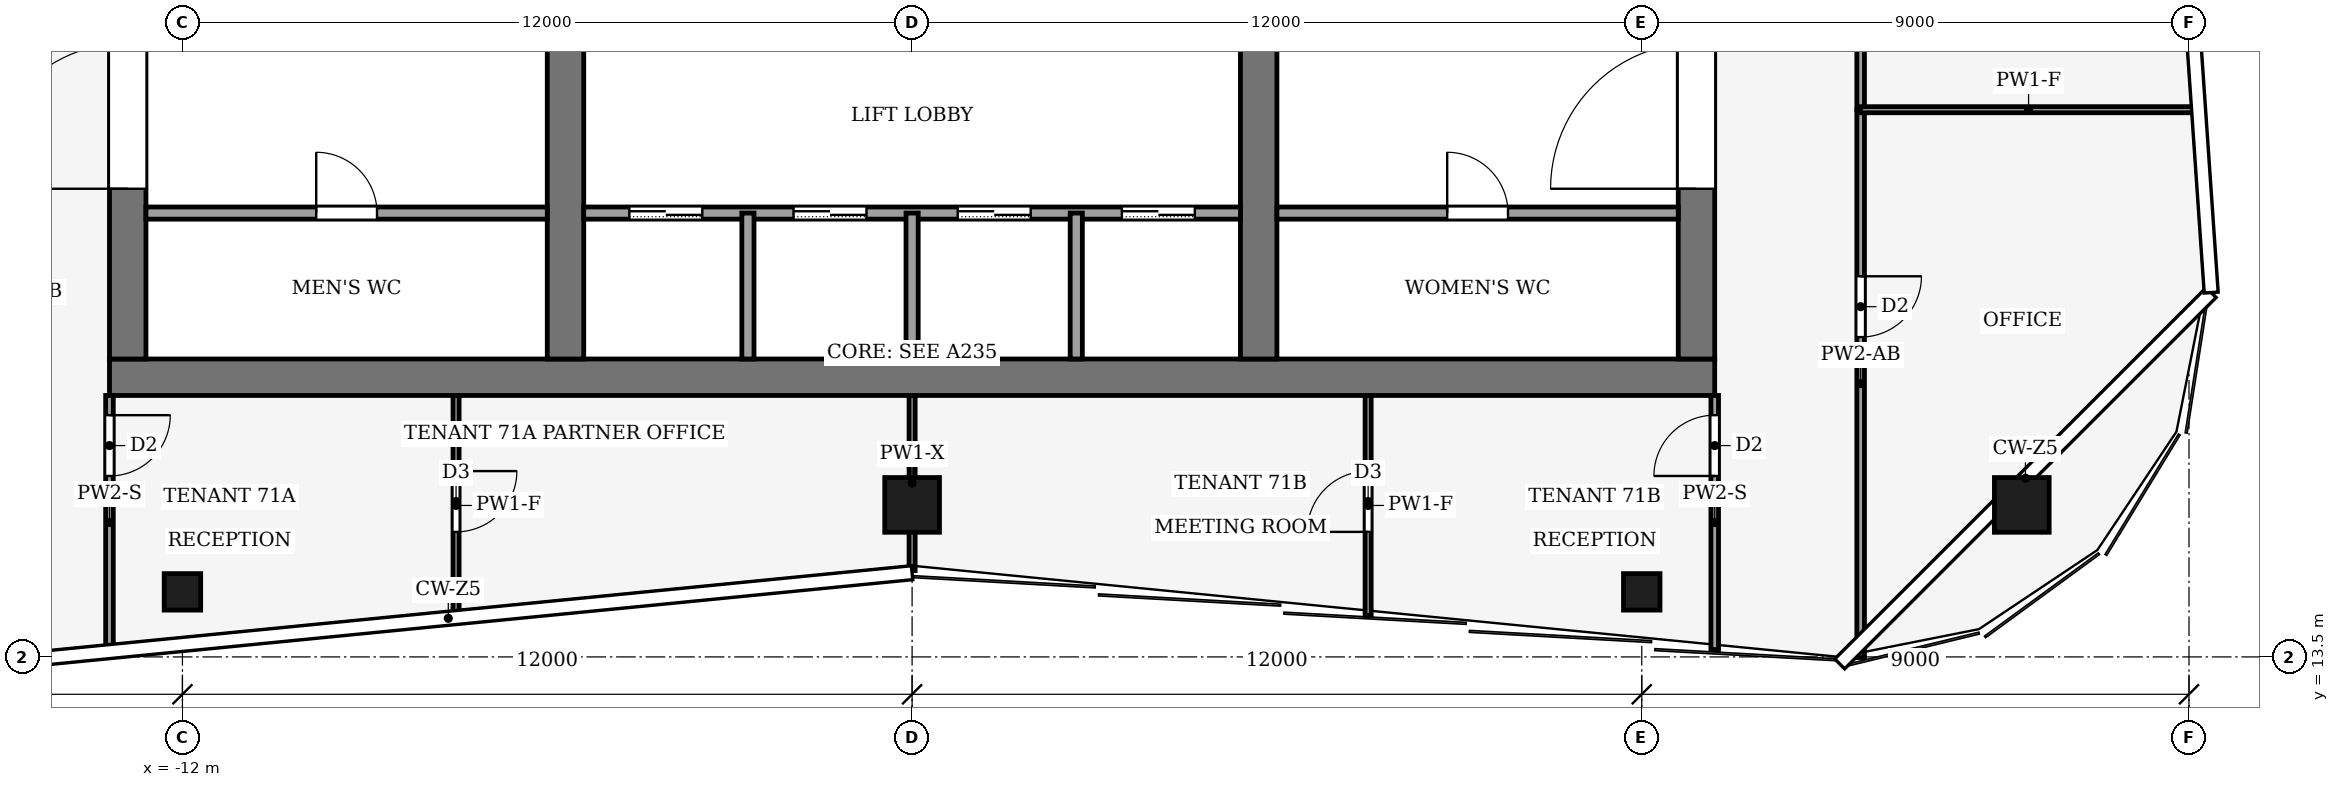
"""IFC4 building model, lengths in metres.
Left out: names, types, materials, properties, quantities, classifications, styles, units other than length and angle.
Written with IfcOpenShell. Run it as: python <this file> out.ifc"""

import sys

from ifc_helpers import new_model, si_unit, direction, frame, frame_2d, origin, origin_2d, place, context, subcontext, project, spatial, rectangle, hollow_rectangle, extrude, element, fill, save


model = new_model("IFC4")
c1 = context("Model", 3, precision=1e-05, world=origin(), true_north=direction((0.0, 1.0)))
c2 = subcontext(c1, "Body", "Model", "MODEL_VIEW")
j1 = project(units=[si_unit("LENGTHUNIT", "METRE"), si_unit("PLANEANGLEUNIT", "RADIAN")], contexts=[c1])
p1 = place(None, origin())
s1 = spatial("IfcSite", under=j1, at=p1, CompositionType="ELEMENT")
p2 = place(p1, origin())
s2 = spatial("IfcBuilding", under=s1, at=p2, CompositionType="ELEMENT")
p3 = place(p2, frame((0.0, 0.0, 310.0)))
s3 = spatial("IfcBuildingStorey", under=s2, at=p3, CompositionType="ELEMENT", Elevation=310.0)
p4 = place(p3, frame((-13.2, 18.1, -0.13), z_axis=(0.0, 0.0, 1.0), x_axis=(1.0, 0.0, 0.0)))
e1 = element("IfcWall", 1, at=p4, inside=s3, PredefinedType="SHEAR", context=c2, shape_type="SweptSolid", body=[
    extrude(rectangle(XDim=26.4, YDim=0.6, at=frame_2d((13.2, 0.0))), origin(), (0.0, 0.0, 1.0), 4.0),
])
p5 = place(p3, frame((-12.9, 18.4, -0.13), z_axis=(0.0, 0.0, 1.0), x_axis=(0.0, 1.0, 0.0)))
e2 = element("IfcWall", 2, at=p5, inside=s3, PredefinedType="SHEAR", context=c2, shape_type="SweptSolid", body=[
    extrude(rectangle(XDim=19.2, YDim=0.6, at=frame_2d((9.6, 0.0))), origin(), (0.0, 0.0, 1.0), 4.0),
])
p6 = place(p5, frame((2.8, 0.0, 0.13)))
e3 = element("IfcOpeningElement", 3, at=p6, cuts=e2, PredefinedType="OPENING", context=c2, shape_type="SweptSolid", body=[
    extrude(rectangle(XDim=2.4, YDim=2.4, at=frame_2d((1.2, 1.2))), frame((0.0, 0.31, 0.0), z_axis=(0.0, -1.0, 0.0), x_axis=(1.0, 0.0, 0.0)), (0.0, 0.0, 1.0), 0.62),
])
p7 = place(p5, frame((13.4, 0.0, 0.13)))
e4 = element("IfcOpeningElement", 4, at=p7, cuts=e2, PredefinedType="OPENING", context=c2, shape_type="SweptSolid", body=[
    extrude(rectangle(XDim=1.4, YDim=2.2, at=frame_2d((0.7, 1.1))), frame((0.0, 0.31, 0.0), z_axis=(0.0, -1.0, 0.0), x_axis=(1.0, 0.0, 0.0)), (0.0, 0.0, 1.0), 0.62),
])
p8 = place(p3, frame((12.9, 18.4, -0.13), z_axis=(0.0, 0.0, 1.0), x_axis=(0.0, 1.0, 0.0)))
e5 = element("IfcWall", 5, at=p8, inside=s3, PredefinedType="SHEAR", context=c2, shape_type="SweptSolid", body=[
    extrude(rectangle(XDim=19.2, YDim=0.6, at=frame_2d((9.6, 0.0))), origin(), (0.0, 0.0, 1.0), 4.0),
])
p9 = place(p8, frame((2.8, 0.0, 0.13)))
e6 = element("IfcOpeningElement", 6, at=p9, cuts=e5, PredefinedType="OPENING", context=c2, shape_type="SweptSolid", body=[
    extrude(rectangle(XDim=2.4, YDim=2.4, at=frame_2d((1.2, 1.2))), frame((0.0, 0.31, 0.0), z_axis=(0.0, -1.0, 0.0), x_axis=(1.0, 0.0, 0.0)), (0.0, 0.0, 1.0), 0.62),
])
p10 = place(p8, frame((13.3, 0.0, 0.13)))
e7 = element("IfcOpeningElement", 7, at=p10, cuts=e5, PredefinedType="OPENING", context=c2, shape_type="SweptSolid", body=[
    extrude(rectangle(XDim=2.4, YDim=2.4, at=frame_2d((1.2, 1.2))), frame((0.0, 0.31, 0.0), z_axis=(0.0, -1.0, 0.0), x_axis=(1.0, 0.0, 0.0)), (0.0, 0.0, 1.0), 0.62),
])
p11 = place(p3, frame((-5.7, 18.4, -0.13), z_axis=(0.0, 0.0, 1.0), x_axis=(0.0, 1.0, 0.0)))
e8 = element("IfcWall", 8, at=p11, inside=s3, PredefinedType="SHEAR", context=c2, shape_type="SweptSolid", body=[
    extrude(rectangle(XDim=19.2, YDim=0.6, at=frame_2d((9.6, 0.0))), origin(), (0.0, 0.0, 1.0), 4.0),
])
p12 = place(p11, frame((8.35, 0.0, 0.13)))
e9 = element("IfcOpeningElement", 9, at=p12, cuts=e8, PredefinedType="OPENING", context=c2, shape_type="SweptSolid", body=[
    extrude(rectangle(XDim=0.9, YDim=2.1, at=frame_2d((0.45, 1.05))), frame((0.0, 0.31, 0.0), z_axis=(0.0, -1.0, 0.0), x_axis=(1.0, 0.0, 0.0)), (0.0, 0.0, 1.0), 0.62),
])
p13 = place(p3, frame((5.7, 18.4, -0.13), z_axis=(0.0, 0.0, 1.0), x_axis=(0.0, 1.0, 0.0)))
e10 = element("IfcWall", 10, at=p13, inside=s3, PredefinedType="SHEAR", context=c2, shape_type="SweptSolid", body=[
    extrude(rectangle(XDim=19.2, YDim=0.6, at=frame_2d((9.6, 0.0))), origin(), (0.0, 0.0, 1.0), 4.0),
])
p14 = place(p13, frame((13.3, 0.0, 0.13)))
e11 = element("IfcOpeningElement", 11, at=p14, cuts=e10, PredefinedType="OPENING", context=c2, shape_type="SweptSolid", body=[
    extrude(rectangle(XDim=2.4, YDim=2.4, at=frame_2d((1.2, 1.2))), frame((0.0, 0.31, 0.0), z_axis=(0.0, -1.0, 0.0), x_axis=(1.0, 0.0, 0.0)), (0.0, 0.0, 1.0), 0.62),
])
for number, where, z_axis, x_axis in (
    (12, (18.25, 16.0, 0.0), (0.0, 0.0, 1.0), (1.0, 0.0, 0.0)),
    (13, (0.0, 16.0, 0.0), (0.0, 0.0, 1.0), (1.0, 0.0, 0.0)),
):
    element("IfcColumn", number, at=place(p3, frame(where, z_axis=z_axis, x_axis=x_axis)), inside=s3, PredefinedType="COLUMN", context=c2, shape_type="SweptSolid", body=[
        extrude(hollow_rectangle(XDim=0.9, YDim=0.9, WallThickness=0.04, at=origin_2d()), origin(), (0.0, 0.0, 1.0), 4.0),
    ])
for number, where, z_axis, x_axis in (
    (14, (-12.0, 14.57, 0.0), (0.0, 0.0, 1.0), (1.0, 0.0, 0.0)),
    (15, (12.0, 14.57, 0.0), (0.0, 0.0, 1.0), (1.0, 0.0, 0.0)),
):
    element("IfcColumn", number, at=place(p3, frame(where, z_axis=z_axis, x_axis=x_axis)), inside=s3, PredefinedType="COLUMN", context=c2, shape_type="SweptSolid", body=[
        extrude(hollow_rectangle(XDim=0.6, YDim=0.6, WallThickness=0.025, at=origin_2d()), origin(), (0.0, 0.0, 1.0), 4.0),
    ])
p15 = place(p3, frame((-12.6, 20.8, 0.0), z_axis=(0.0, 0.0, 1.0), x_axis=(1.0, 0.0, 0.0)))
e16 = element("IfcWall", 16, at=p15, inside=s3, PredefinedType="PARTITIONING", context=c2, shape_type="SweptSolid", body=[
    extrude(rectangle(XDim=6.6, YDim=0.2, at=frame_2d((3.3, 0.0))), origin(), (0.0, 0.0, 1.0), 3.87),
])
p16 = place(p15, frame((2.8, 0.0, 0.0)))
e17 = element("IfcOpeningElement", 17, at=p16, cuts=e16, PredefinedType="OPENING", context=c2, shape_type="SweptSolid", body=[
    extrude(rectangle(XDim=1.0, YDim=2.1, at=frame_2d((0.5, 1.05))), frame((0.0, 0.11, 0.0), z_axis=(0.0, -1.0, 0.0), x_axis=(1.0, 0.0, 0.0)), (0.0, 0.0, 1.0), 0.22),
])
p17 = place(p3, frame((-5.4, 20.8, 0.0), z_axis=(0.0, 0.0, 1.0), x_axis=(1.0, 0.0, 0.0)))
e18 = element("IfcWall", 18, at=p17, inside=s3, PredefinedType="PARTITIONING", context=c2, shape_type="SweptSolid", body=[
    extrude(rectangle(XDim=10.8, YDim=0.2, at=frame_2d((5.4, 0.0))), origin(), (0.0, 0.0, 1.0), 3.87),
])
p18 = place(p17, frame((0.75, 0.0, 0.0)))
e19 = element("IfcOpeningElement", 19, at=p18, cuts=e18, PredefinedType="OPENING", context=c2, shape_type="SweptSolid", body=[
    extrude(rectangle(XDim=1.2, YDim=2.2, at=frame_2d((0.6, 1.1))), frame((0.0, 0.11, 0.0), z_axis=(0.0, -1.0, 0.0), x_axis=(1.0, 0.0, 0.0)), (0.0, 0.0, 1.0), 0.22),
])
p19 = place(p17, frame((3.45, 0.0, 0.0)))
e20 = element("IfcOpeningElement", 20, at=p19, cuts=e18, PredefinedType="OPENING", context=c2, shape_type="SweptSolid", body=[
    extrude(rectangle(XDim=1.2, YDim=2.2, at=frame_2d((0.6, 1.1))), frame((0.0, 0.11, 0.0), z_axis=(0.0, -1.0, 0.0), x_axis=(1.0, 0.0, 0.0)), (0.0, 0.0, 1.0), 0.22),
])
p20 = place(p17, frame((6.15, 0.0, 0.0)))
e21 = element("IfcOpeningElement", 21, at=p20, cuts=e18, PredefinedType="OPENING", context=c2, shape_type="SweptSolid", body=[
    extrude(rectangle(XDim=1.2, YDim=2.2, at=frame_2d((0.6, 1.1))), frame((0.0, 0.11, 0.0), z_axis=(0.0, -1.0, 0.0), x_axis=(1.0, 0.0, 0.0)), (0.0, 0.0, 1.0), 0.22),
])
p21 = place(p17, frame((8.85, 0.0, 0.0)))
e22 = element("IfcOpeningElement", 22, at=p21, cuts=e18, PredefinedType="OPENING", context=c2, shape_type="SweptSolid", body=[
    extrude(rectangle(XDim=1.2, YDim=2.2, at=frame_2d((0.6, 1.1))), frame((0.0, 0.11, 0.0), z_axis=(0.0, -1.0, 0.0), x_axis=(1.0, 0.0, 0.0)), (0.0, 0.0, 1.0), 0.22),
])
p22 = place(p3, frame((6.0, 20.8, 0.0), z_axis=(0.0, 0.0, 1.0), x_axis=(1.0, 0.0, 0.0)))
e23 = element("IfcWall", 23, at=p22, inside=s3, PredefinedType="PARTITIONING", context=c2, shape_type="SweptSolid", body=[
    extrude(rectangle(XDim=6.6, YDim=0.2, at=frame_2d((3.3, 0.0))), origin(), (0.0, 0.0, 1.0), 3.87),
])
p23 = place(p22, frame((2.8, 0.0, 0.0)))
e24 = element("IfcOpeningElement", 24, at=p23, cuts=e23, PredefinedType="OPENING", context=c2, shape_type="SweptSolid", body=[
    extrude(rectangle(XDim=1.0, YDim=2.1, at=frame_2d((0.5, 1.05))), frame((0.0, 0.11, 0.0), z_axis=(0.0, -1.0, 0.0), x_axis=(1.0, 0.0, 0.0)), (0.0, 0.0, 1.0), 0.22),
])
for number, where, z_axis, x_axis in (
    (25, (-2.7, 18.4, 0.0), (0.0, 0.0, 1.0), (0.0, 1.0, 0.0)),
    (26, (0.0, 18.4, 0.0), (0.0, 0.0, 1.0), (0.0, 1.0, 0.0)),
    (27, (2.7, 18.4, 0.0), (0.0, 0.0, 1.0), (0.0, 1.0, 0.0)),
):
    element("IfcWall", number, at=place(p3, frame(where, z_axis=z_axis, x_axis=x_axis)), inside=s3, PredefinedType="PARTITIONING", context=c2, shape_type="SweptSolid", body=[
        extrude(rectangle(XDim=2.4, YDim=0.2, at=frame_2d((1.2, 0.0))), origin(), (0.0, 0.0, 1.0), 3.87),
    ])
p24 = place(p3, frame((15.6, 22.5, 0.0), z_axis=(0.0, 0.0, 1.0), x_axis=(0.0, -1.0, 0.0)))
e28 = element("IfcWall", 28, at=p24, inside=s3, PredefinedType="PARTITIONING", context=c2, shape_type="SweptSolid", body=[
    extrude(rectangle(XDim=9.01, YDim=0.125, at=frame_2d((4.505, 0.0))), origin(), (0.0, 0.0, 1.0), 2.93),
])
p25 = place(p24, frame((2.74, 0.0, 0.0)))
e29 = element("IfcOpeningElement", 29, at=p25, cuts=e28, PredefinedType="OPENING", context=c2, shape_type="SweptSolid", body=[
    extrude(rectangle(XDim=1.0, YDim=2.1, at=frame_2d((0.5, 1.05))), frame((0.0, 0.073, 0.0), z_axis=(0.0, -1.0, 0.0), x_axis=(1.0, 0.0, 0.0)), (0.0, 0.0, 1.0), 0.145),
])
p26 = place(p3, frame((15.6, 25.5, 0.0), z_axis=(0.0, 0.0, 1.0), x_axis=(0.0, -1.0, 0.0)))
e30 = element("IfcWall", 30, at=p26, inside=s3, PredefinedType="PARTITIONING", context=c2, shape_type="SweptSolid", body=[
    extrude(rectangle(XDim=3.0, YDim=0.125, at=frame_2d((1.5, 0.0))), origin(), (0.0, 0.0, 1.0), 3.54),
])
p27 = place(p26, frame((1.0, 0.0, 0.0)))
e31 = element("IfcOpeningElement", 31, at=p27, cuts=e30, PredefinedType="OPENING", context=c2, shape_type="SweptSolid", body=[
    extrude(rectangle(XDim=1.0, YDim=2.1, at=frame_2d((0.5, 1.05))), frame((0.0, 0.073, 0.0), z_axis=(0.0, -1.0, 0.0), x_axis=(1.0, 0.0, 0.0)), (0.0, 0.0, 1.0), 0.145),
])
p28 = place(p3, frame((-13.2, 17.8, 0.0), z_axis=(0.0, 0.0, 1.0), x_axis=(0.0, -1.0, 0.0)))
e32 = element("IfcWall", 32, at=p28, inside=s3, PredefinedType="PARTITIONING", context=c2, shape_type="SweptSolid", body=[
    extrude(rectangle(XDim=4.178, YDim=0.125, at=frame_2d((2.089, 0.0))), origin(), (0.0, 0.0, 1.0), 3.04),
])
p29 = place(p28, frame((0.324, 0.0, 0.0)))
e33 = element("IfcOpeningElement", 33, at=p29, cuts=e32, PredefinedType="OPENING", context=c2, shape_type="SweptSolid", body=[
    extrude(rectangle(XDim=1.0, YDim=2.1, at=frame_2d((0.5, 1.05))), frame((0.0, 0.073, 0.0), z_axis=(0.0, -1.0, 0.0), x_axis=(1.0, 0.0, 0.0)), (0.0, 0.0, 1.0), 0.145),
])
p30 = place(p3, frame((13.2, 13.622, 0.0), z_axis=(0.0, 0.0, 1.0), x_axis=(0.0, 1.0, 0.0)))
e34 = element("IfcWall", 34, at=p30, inside=s3, PredefinedType="PARTITIONING", context=c2, shape_type="SweptSolid", body=[
    extrude(rectangle(XDim=4.178, YDim=0.125, at=frame_2d((2.089, 0.0))), origin(), (0.0, 0.0, 1.0), 3.04),
])
p31 = place(p30, frame((2.854, 0.0, 0.0)))
e35 = element("IfcOpeningElement", 35, at=p31, cuts=e34, PredefinedType="OPENING", context=c2, shape_type="SweptSolid", body=[
    extrude(rectangle(XDim=1.0, YDim=2.1, at=frame_2d((0.5, 1.05))), frame((0.0, 0.073, 0.0), z_axis=(0.0, -1.0, 0.0), x_axis=(1.0, 0.0, 0.0)), (0.0, 0.0, 1.0), 0.145),
])
p32 = place(p3, frame((21.123, 22.5, 0.0), z_axis=(0.0, 0.0, 1.0), x_axis=(-1.0, 0.0, 0.0)))
e36 = element("IfcWall", 36, at=p32, inside=s3, PredefinedType="PARTITIONING", context=c2, shape_type="SweptSolid", body=[
    extrude(rectangle(XDim=5.523, YDim=0.1, at=frame_2d((2.761, 0.0))), origin(), (0.0, 0.0, 1.0), 3.04),
])
p33 = place(p3, frame((-7.5, 17.8, 0.0), z_axis=(0.0, 0.0, 1.0), x_axis=(0.0, -1.0, 0.0)))
e37 = element("IfcWall", 37, at=p33, inside=s3, PredefinedType="PARTITIONING", context=c2, shape_type="SweptSolid", body=[
    extrude(rectangle(XDim=3.618, YDim=0.1, at=frame_2d((1.809, 0.0))), origin(), (0.0, 0.0, 1.0), 3.04),
])
p34 = place(p33, frame((1.244, 0.0, 0.0)))
e38 = element("IfcOpeningElement", 38, at=p34, cuts=e37, PredefinedType="OPENING", context=c2, shape_type="SweptSolid", body=[
    extrude(rectangle(XDim=1.0, YDim=2.1, at=frame_2d((0.5, 1.05))), frame((0.0, 0.06, 0.0), z_axis=(0.0, -1.0, 0.0), x_axis=(1.0, 0.0, 0.0)), (0.0, 0.0, 1.0), 0.12),
])
p35 = place(p3, frame((0.0, 14.92, 0.0), z_axis=(0.0, 0.0, 1.0), x_axis=(0.0, 1.0, 0.0)))
e39 = element("IfcWall", 39, at=p35, inside=s3, PredefinedType="PARTITIONING", context=c2, shape_type="SweptSolid", body=[
    extrude(rectangle(XDim=2.88, YDim=0.1, at=frame_2d((1.44, 0.0))), origin(), (0.0, 0.0, 1.0), 3.54),
])
p36 = place(p3, frame((7.5, 14.182, 0.0), z_axis=(0.0, 0.0, 1.0), x_axis=(0.0, 1.0, 0.0)))
e40 = element("IfcWall", 40, at=p36, inside=s3, PredefinedType="PARTITIONING", context=c2, shape_type="SweptSolid", body=[
    extrude(rectangle(XDim=3.618, YDim=0.1, at=frame_2d((1.809, 0.0))), origin(), (0.0, 0.0, 1.0), 3.04),
])
p37 = place(p36, frame((1.374, 0.0, 0.0)))
e41 = element("IfcOpeningElement", 41, at=p37, cuts=e40, PredefinedType="OPENING", context=c2, shape_type="SweptSolid", body=[
    extrude(rectangle(XDim=1.0, YDim=2.1, at=frame_2d((0.5, 1.05))), frame((0.0, 0.06, 0.0), z_axis=(0.0, -1.0, 0.0), x_axis=(1.0, 0.0, 0.0)), (0.0, 0.0, 1.0), 0.12),
])
p38 = place(p18, origin())
e42 = element("IfcDoor", 42, at=p38, inside=s3, OperationType="SLIDING_TO_LEFT", PredefinedType="DOOR", context=c2, shape_type="SweptSolid", body=[
    extrude(rectangle(XDim=1.2, YDim=2.2, at=frame_2d((0.6, 1.1))), frame((0.0, 0.025, 0.0), z_axis=(0.0, -1.0, 0.0), x_axis=(1.0, 0.0, 0.0)), (0.0, 0.0, 1.0), 0.05),
])
fill(e19, e42)
p39 = place(p19, origin())
e43 = element("IfcDoor", 43, at=p39, inside=s3, OperationType="SLIDING_TO_LEFT", PredefinedType="DOOR", context=c2, shape_type="SweptSolid", body=[
    extrude(rectangle(XDim=1.2, YDim=2.2, at=frame_2d((0.6, 1.1))), frame((0.0, 0.025, 0.0), z_axis=(0.0, -1.0, 0.0), x_axis=(1.0, 0.0, 0.0)), (0.0, 0.0, 1.0), 0.05),
])
fill(e20, e43)
p40 = place(p20, origin())
e44 = element("IfcDoor", 44, at=p40, inside=s3, OperationType="SLIDING_TO_LEFT", PredefinedType="DOOR", context=c2, shape_type="SweptSolid", body=[
    extrude(rectangle(XDim=1.2, YDim=2.2, at=frame_2d((0.6, 1.1))), frame((0.0, 0.025, 0.0), z_axis=(0.0, -1.0, 0.0), x_axis=(1.0, 0.0, 0.0)), (0.0, 0.0, 1.0), 0.05),
])
fill(e21, e44)
p41 = place(p21, origin())
e45 = element("IfcDoor", 45, at=p41, inside=s3, OperationType="SLIDING_TO_LEFT", PredefinedType="DOOR", context=c2, shape_type="SweptSolid", body=[
    extrude(rectangle(XDim=1.2, YDim=2.2, at=frame_2d((0.6, 1.1))), frame((0.0, 0.025, 0.0), z_axis=(0.0, -1.0, 0.0), x_axis=(1.0, 0.0, 0.0)), (0.0, 0.0, 1.0), 0.05),
])
fill(e22, e45)
p42 = place(p16, origin())
e46 = element("IfcDoor", 46, at=p42, inside=s3, OperationType="SINGLE_SWING_LEFT", PredefinedType="DOOR", context=c2, shape_type="SweptSolid", body=[
    extrude(rectangle(XDim=1.0, YDim=2.1, at=frame_2d((0.5, 1.05))), frame((0.0, 0.025, 0.0), z_axis=(0.0, -1.0, 0.0), x_axis=(1.0, 0.0, 0.0)), (0.0, 0.0, 1.0), 0.05),
])
fill(e17, e46)
p43 = place(p23, origin())
e47 = element("IfcDoor", 47, at=p43, inside=s3, OperationType="SINGLE_SWING_RIGHT", PredefinedType="DOOR", context=c2, shape_type="SweptSolid", body=[
    extrude(rectangle(XDim=1.0, YDim=2.1, at=frame_2d((0.5, 1.05))), frame((0.0, 0.025, 0.0), z_axis=(0.0, -1.0, 0.0), x_axis=(1.0, 0.0, 0.0)), (0.0, 0.0, 1.0), 0.05),
])
fill(e24, e47)
p44 = place(p6, origin())
e48 = element("IfcDoor", 48, at=p44, inside=s3, OperationType="DOUBLE_DOOR_SINGLE_SWING", PredefinedType="DOOR", context=c2, shape_type="SweptSolid", body=[
    extrude(rectangle(XDim=2.4, YDim=2.4, at=frame_2d((1.2, 1.2))), frame((0.0, 0.025, 0.0), z_axis=(0.0, -1.0, 0.0), x_axis=(1.0, 0.0, 0.0)), (0.0, 0.0, 1.0), 0.05),
])
fill(e3, e48)
p45 = place(p9, origin())
e49 = element("IfcDoor", 49, at=p45, inside=s3, OperationType="DOUBLE_DOOR_SINGLE_SWING", PredefinedType="DOOR", context=c2, shape_type="SweptSolid", body=[
    extrude(rectangle(XDim=2.4, YDim=2.4, at=frame_2d((1.2, 1.2))), frame((0.0, 0.025, 0.0), z_axis=(0.0, -1.0, 0.0), x_axis=(1.0, 0.0, 0.0)), (0.0, 0.0, 1.0), 0.05),
])
fill(e6, e49)
p46 = place(p25, origin())
e50 = element("IfcDoor", 50, at=p46, inside=s3, OperationType="SINGLE_SWING_LEFT", PredefinedType="DOOR", context=c2, shape_type="SweptSolid", body=[
    extrude(rectangle(XDim=1.0, YDim=2.1, at=frame_2d((0.5, 1.05))), frame((0.0, 0.025, 0.0), z_axis=(0.0, -1.0, 0.0), x_axis=(1.0, 0.0, 0.0)), (0.0, 0.0, 1.0), 0.05),
])
fill(e29, e50)
p47 = place(p29, origin())
e51 = element("IfcDoor", 51, at=p47, inside=s3, OperationType="SINGLE_SWING_LEFT", PredefinedType="DOOR", context=c2, shape_type="SweptSolid", body=[
    extrude(rectangle(XDim=1.0, YDim=2.1, at=frame_2d((0.5, 1.05))), frame((0.0, 0.025, 0.0), z_axis=(0.0, -1.0, 0.0), x_axis=(1.0, 0.0, 0.0)), (0.0, 0.0, 1.0), 0.05),
])
fill(e33, e51)
p48 = place(p31, origin())
e52 = element("IfcDoor", 52, at=p48, inside=s3, OperationType="SINGLE_SWING_RIGHT", PredefinedType="DOOR", context=c2, shape_type="SweptSolid", body=[
    extrude(rectangle(XDim=1.0, YDim=2.1, at=frame_2d((0.5, 1.05))), frame((0.0, 0.025, 0.0), z_axis=(0.0, -1.0, 0.0), x_axis=(1.0, 0.0, 0.0)), (0.0, 0.0, 1.0), 0.05),
])
fill(e35, e52)
p49 = place(p34, origin())
e53 = element("IfcDoor", 53, at=p49, inside=s3, OperationType="SINGLE_SWING_LEFT", PredefinedType="DOOR", context=c2, shape_type="SweptSolid", body=[
    extrude(rectangle(XDim=1.0, YDim=2.1, at=frame_2d((0.5, 1.05))), frame((0.0, 0.025, 0.0), z_axis=(0.0, -1.0, 0.0), x_axis=(1.0, 0.0, 0.0)), (0.0, 0.0, 1.0), 0.05),
])
fill(e38, e53)
p50 = place(p37, origin())
e54 = element("IfcDoor", 54, at=p50, inside=s3, OperationType="SINGLE_SWING_RIGHT", PredefinedType="DOOR", context=c2, shape_type="SweptSolid", body=[
    extrude(rectangle(XDim=1.0, YDim=2.1, at=frame_2d((0.5, 1.05))), frame((0.0, 0.025, 0.0), z_axis=(0.0, -1.0, 0.0), x_axis=(1.0, 0.0, 0.0)), (0.0, 0.0, 1.0), 0.05),
])
fill(e41, e54)
save(model, sys.argv[1])
